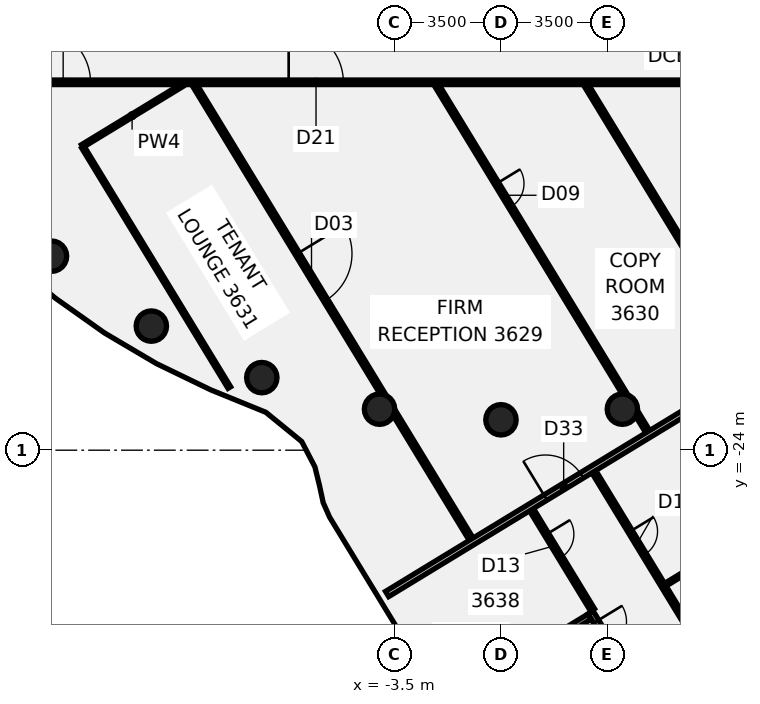
"""IFC4 building model, lengths in metres.
Left out: names, types, materials, properties, quantities, classifications, styles, units other than length and angle.
Written with IfcOpenShell. Run it as: python <this file> out.ifc"""

import sys

from ifc_helpers import new_model, si_unit, direction, frame, frame_2d, origin, origin_2d, place, context, subcontext, project, spatial, rectangle, circle, extrude, element, fill, save


model = new_model("IFC4")
c1 = context("Model", 3, precision=1e-05, world=origin(), true_north=direction((0.0, 1.0)))
c2 = subcontext(c1, "Body", "Model", "MODEL_VIEW")
j1 = project(units=[si_unit("LENGTHUNIT", "METRE"), si_unit("PLANEANGLEUNIT", "RADIAN")], contexts=[c1])
p1 = place(None, origin())
s1 = spatial("IfcSite", under=j1, at=p1, CompositionType="ELEMENT")
p2 = place(p1, origin())
s2 = spatial("IfcBuilding", under=s1, at=p2, CompositionType="ELEMENT")
p3 = place(p2, frame((0.0, 0.0, 148.0)))
s3 = spatial("IfcBuildingStorey", under=s2, at=p3, CompositionType="ELEMENT", Elevation=148.0)
for number, where, z_axis, x_axis in (
    (1, (-14.784, -17.619, -0.14), (0.0, 0.0, 1.0), (1.0, 0.0, 0.0)),
    (2, (-11.5, -19.919, -0.14), (0.0, 0.0, 1.0), (1.0, 0.0, 0.0)),
    (3, (-7.866, -21.613, -0.14), (0.0, 0.0, 1.0), (1.0, 0.0, 0.0)),
    (4, (-3.994, -22.651, -0.14), (0.0, 0.0, 1.0), (1.0, 0.0, 0.0)),
    (5, (0.0, -23.0, -0.14), (0.0, 0.0, 1.0), (1.0, 0.0, 0.0)),
    (6, (3.994, -22.651, -0.14), (0.0, 0.0, 1.0), (1.0, 0.0, 0.0)),
):
    element("IfcColumn", number, at=place(p3, frame(where, z_axis=z_axis, x_axis=x_axis)), inside=s3, PredefinedType="COLUMN", context=c2, shape_type="SweptSolid", body=[
        extrude(circle(Radius=0.5, at=origin_2d()), origin(), (0.0, 0.0, 1.0), 3.75),
    ])
p4 = place(p3, frame((-13.747, -14.039, 0.0), z_axis=(0.0, 0.0, 1.0), x_axis=(0.520158758084, -0.854069591069, 0.0)))
e7 = element("IfcWall", 7, at=p4, inside=s3, PredefinedType="PARTITIONING", context=c2, shape_type="SweptSolid", body=[
    extrude(rectangle(XDim=9.25, YDim=0.1, at=frame_2d((4.625, 0.0))), origin(), (0.0, 0.0, 1.0), 3.01),
])
p5 = place(p3, frame((-10.073, -11.998, 0.0), z_axis=(0.0, 0.0, 1.0), x_axis=(0.520207638853, -0.854039819024, 0.0)))
e8 = element("IfcWall", 8, at=p5, inside=s3, PredefinedType="PARTITIONING", context=c2, shape_type="SweptSolid", body=[
    extrude(rectangle(XDim=11.913, YDim=0.15, at=frame_2d((5.956, 0.0))), origin(), (0.0, 0.0, 1.0), 3.01),
])
p6 = place(p5, frame((6.485, 0.0, 0.0)))
e9 = element("IfcOpeningElement", 9, at=p6, cuts=e8, PredefinedType="OPENING", context=c2, shape_type="SweptSolid", body=[
    extrude(rectangle(XDim=1.8, YDim=2.1, at=frame_2d((0.9, 1.05))), frame((0.0, 0.085, 0.0), z_axis=(0.0, -1.0, 0.0), x_axis=(1.0, 0.0, 0.0)), (0.0, 0.0, 1.0), 0.17),
])
p7 = place(p3, frame((-3.515, -22.766, 0.0), z_axis=(0.0, 0.0, 1.0), x_axis=(0.520185263298, -0.854053447887, 0.0)))
e10 = element("IfcWall", 10, at=p7, inside=s3, PredefinedType="PARTITIONING", context=c2, shape_type="SweptSolid", body=[
    extrude(rectangle(XDim=4.875, YDim=0.15, at=frame_2d((2.437, 0.0))), origin(), (0.0, 0.0, 1.0), 3.01),
])
p8 = place(p3, frame((-2.111, -11.998, 0.0), z_axis=(0.0, 0.0, 1.0), x_axis=(0.520158414561, -0.854069800287, 0.0)))
e11 = element("IfcWall", 11, at=p8, inside=s3, PredefinedType="PARTITIONING", context=c2, shape_type="SweptSolid", body=[
    extrude(rectangle(XDim=11.902, YDim=0.15, at=frame_2d((5.951, 0.0))), origin(), (0.0, 0.0, 1.0), 3.01),
])
p9 = place(p8, frame((3.785, 0.0, 0.0)))
e12 = element("IfcOpeningElement", 12, at=p9, cuts=e11, PredefinedType="OPENING", context=c2, shape_type="SweptSolid", body=[
    extrude(rectangle(XDim=0.9, YDim=2.1, at=frame_2d((0.45, 1.05))), frame((0.0, 0.085, 0.0), z_axis=(0.0, -1.0, 0.0), x_axis=(1.0, 0.0, 0.0)), (0.0, 0.0, 1.0), 0.17),
])
p10 = place(p3, frame((4.465, -22.796, 0.0), z_axis=(0.0, 0.0, 1.0), x_axis=(0.519991350708, -0.854171525625, 0.0)))
e13 = element("IfcWall", 13, at=p10, inside=s3, PredefinedType="PARTITIONING", context=c2, shape_type="SweptSolid", body=[
    extrude(rectangle(XDim=0.698, YDim=0.15, at=frame_2d((0.349, 0.0))), origin(), (0.0, 0.0, 1.0), 3.01),
])
p11 = place(p3, frame((1.004, -25.955, 0.0), z_axis=(0.0, 0.0, 1.0), x_axis=(0.520149611464, -0.854075161619, 0.0)))
e14 = element("IfcWall", 14, at=p11, inside=s3, PredefinedType="PARTITIONING", context=c2, shape_type="SweptSolid", body=[
    extrude(rectangle(XDim=3.86, YDim=0.15, at=frame_2d((1.93, 0.0))), origin(), (0.0, 0.0, 1.0), 3.01),
])
p12 = place(p11, frame((0.95, 0.0, 0.0)))
e15 = element("IfcOpeningElement", 15, at=p12, cuts=e14, PredefinedType="OPENING", context=c2, shape_type="SweptSolid", body=[
    extrude(rectangle(XDim=0.9, YDim=2.1, at=frame_2d((0.45, 1.05))), frame((0.0, 0.085, 0.0), z_axis=(0.0, -1.0, 0.0), x_axis=(1.0, 0.0, 0.0)), (0.0, 0.0, 1.0), 0.17),
])
p13 = place(p3, frame((2.807, -11.998, 0.0), z_axis=(0.0, 0.0, 1.0), x_axis=(0.520227143578, -0.854027938117, 0.0)))
e16 = element("IfcWall", 16, at=p13, inside=s3, PredefinedType="PARTITIONING", context=c2, shape_type="SweptSolid", body=[
    extrude(rectangle(XDim=13.129, YDim=0.15, at=frame_2d((6.564, 0.0))), origin(), (0.0, 0.0, 1.0), 3.01),
])
p14 = place(p3, frame((3.054, -24.706, 0.0), z_axis=(0.0, 0.0, 1.0), x_axis=(0.520172066884, -0.854061485394, 0.0)))
e17 = element("IfcWall", 17, at=p14, inside=s3, PredefinedType="PARTITIONING", context=c2, shape_type="SweptSolid", body=[
    extrude(rectangle(XDim=17.82, YDim=0.15, at=frame_2d((8.91, 0.0))), origin(), (0.0, 0.0, 1.0), 3.01),
])
p15 = place(p14, frame((2.3, 0.0, 0.0)))
e18 = element("IfcOpeningElement", 18, at=p15, cuts=e17, PredefinedType="OPENING", context=c2, shape_type="SweptSolid", body=[
    extrude(rectangle(XDim=0.9, YDim=2.1, at=frame_2d((0.45, 1.05))), frame((0.0, 0.085, 0.0), z_axis=(0.0, -1.0, 0.0), x_axis=(1.0, 0.0, 0.0)), (0.0, 0.0, 1.0), 0.17),
])
p16 = place(p14, frame((5.599, 0.0, 0.0)))
e19 = element("IfcOpeningElement", 19, at=p16, cuts=e17, PredefinedType="OPENING", context=c2, shape_type="SweptSolid", body=[
    extrude(rectangle(XDim=0.9, YDim=2.1, at=frame_2d((0.45, 1.05))), frame((0.0, 0.085, 0.0), z_axis=(0.0, -1.0, 0.0), x_axis=(1.0, 0.0, 0.0)), (0.0, 0.0, 1.0), 0.17),
])
p17 = place(p14, frame((11.3, 0.0, 0.0)))
e20 = element("IfcOpeningElement", 20, at=p17, cuts=e17, PredefinedType="OPENING", context=c2, shape_type="SweptSolid", body=[
    extrude(rectangle(XDim=0.9, YDim=2.1, at=frame_2d((0.45, 1.05))), frame((0.0, 0.085, 0.0), z_axis=(0.0, -1.0, 0.0), x_axis=(1.0, 0.0, 0.0)), (0.0, 0.0, 1.0), 0.17),
])
p18 = place(p14, frame((14.6, 0.0, 0.0)))
e21 = element("IfcOpeningElement", 21, at=p18, cuts=e17, PredefinedType="OPENING", context=c2, shape_type="SweptSolid", body=[
    extrude(rectangle(XDim=0.9, YDim=2.1, at=frame_2d((0.45, 1.05))), frame((0.0, 0.085, 0.0), z_axis=(0.0, -1.0, 0.0), x_axis=(1.0, 0.0, 0.0)), (0.0, 0.0, 1.0), 0.17),
])
p19 = place(p3, frame((-17.1, -11.9, 0.0), z_axis=(0.0, 0.0, 1.0), x_axis=(1.0, 0.0, 0.0)))
e22 = element("IfcWall", 22, at=p19, inside=s3, PredefinedType="PARTITIONING", context=c2, shape_type="SweptSolid", body=[
    extrude(rectangle(XDim=34.165, YDim=0.15, at=frame_2d((17.083, 0.0))), origin(), (0.0, 0.0, 1.0), 3.01),
])
p20 = place(p19, frame((10.117, 0.0, 0.0)))
e23 = element("IfcOpeningElement", 23, at=p20, cuts=e22, PredefinedType="OPENING", context=c2, shape_type="SweptSolid", body=[
    extrude(rectangle(XDim=1.8, YDim=2.1, at=frame_2d((0.9, 1.05))), frame((0.0, 0.085, 0.0), z_axis=(0.0, -1.0, 0.0), x_axis=(1.0, 0.0, 0.0)), (0.0, 0.0, 1.0), 0.17),
])
p21 = place(p19, frame((1.8, 0.0, 0.0)))
e24 = element("IfcOpeningElement", 24, at=p21, cuts=e22, PredefinedType="OPENING", context=c2, shape_type="SweptSolid", body=[
    extrude(rectangle(XDim=1.8, YDim=2.1, at=frame_2d((0.9, 1.05))), frame((0.0, 0.085, 0.0), z_axis=(0.0, -1.0, 0.0), x_axis=(1.0, 0.0, 0.0)), (0.0, 0.0, 1.0), 0.17),
])
p22 = place(p19, frame((25.997, 0.0, 0.0)))
e25 = element("IfcOpeningElement", 25, at=p22, cuts=e22, PredefinedType="OPENING", context=c2, shape_type="SweptSolid", body=[
    extrude(rectangle(XDim=1.8, YDim=2.1, at=frame_2d((0.9, 1.05))), frame((0.0, 0.085, 0.0), z_axis=(0.0, -1.0, 0.0), x_axis=(1.0, 0.0, 0.0)), (0.0, 0.0, 1.0), 0.17),
])
p23 = place(p3, frame((-13.773, -13.996, 0.0), z_axis=(0.0, 0.0, 1.0), x_axis=(0.85407452776, 0.520150652245, 0.0)))
e26 = element("IfcWall", 26, at=p23, inside=s3, PredefinedType="PARTITIONING", context=c2, shape_type="SweptSolid", body=[
    extrude(rectangle(XDim=3.84, YDim=0.1, at=frame_2d((1.92, 0.0))), origin(), (0.0, 0.0, 1.0), 3.01),
])
p24 = place(p3, frame((-3.745, -28.73, 0.0), z_axis=(0.0, 0.0, 1.0), x_axis=(0.854090748312, 0.520124017565, 0.0)))
e27 = element("IfcWall", 27, at=p24, inside=s3, PredefinedType="PARTITIONING", context=c2, shape_type="SweptSolid", body=[
    extrude(rectangle(XDim=13.121, YDim=0.2, at=frame_2d((6.561, 0.0))), origin(), (0.0, 0.0, 1.0), 3.01),
])
p25 = place(p24, frame((6.099, 0.0, 0.0)))
e28 = element("IfcOpeningElement", 28, at=p25, cuts=e27, PredefinedType="OPENING", context=c2, shape_type="SweptSolid", body=[
    extrude(rectangle(XDim=1.4, YDim=2.1, at=frame_2d((0.7, 1.05))), frame((0.0, 0.11, 0.0), z_axis=(0.0, -1.0, 0.0), x_axis=(1.0, 0.0, 0.0)), (0.0, 0.0, 1.0), 0.22),
])
p26 = place(p3, frame((5.41, -28.422, 0.0), z_axis=(0.0, 0.0, 1.0), x_axis=(0.854092814708, 0.520120624341, 0.0)))
e29 = element("IfcWall", 29, at=p26, inside=s3, PredefinedType="PARTITIONING", context=c2, shape_type="SweptSolid", body=[
    extrude(rectangle(XDim=3.701, YDim=0.1, at=frame_2d((1.851, 0.0))), origin(), (0.0, 0.0, 1.0), 3.01),
])
p27 = place(p3, frame((2.947, -29.338, -0.14), z_axis=(0.0, 0.0, 1.0), x_axis=(0.520196616646, -0.854046532708, 0.0)))
e30 = element("IfcWall", 30, at=p27, inside=s3, PredefinedType="SHEAR", context=c2, shape_type="SweptSolid", body=[
    extrude(rectangle(XDim=6.7, YDim=0.2, at=frame_2d((3.35, 0.0))), origin(), (0.0, 0.0, 1.0), 3.15),
])
p28 = place(p27, frame((0.35, 0.0, 0.0)))
e31 = element("IfcOpeningElement", 31, at=p28, cuts=e30, PredefinedType="OPENING", context=c2, shape_type="SweptSolid", body=[
    extrude(rectangle(XDim=1.0, YDim=2.1, at=frame_2d((0.5, 1.05))), frame((0.0, 0.11, 0.0), z_axis=(0.0, -1.0, 0.0), x_axis=(1.0, 0.0, 0.0)), (0.0, 0.0, 1.0), 0.22),
])
p29 = place(p3, frame((0.181, -31.14, -0.14), z_axis=(0.0, 0.0, 1.0), x_axis=(0.854074782587, 0.520150233826, 0.0)))
e32 = element("IfcWall", 32, at=p29, inside=s3, PredefinedType="SHEAR", context=c2, shape_type="SweptSolid", body=[
    extrude(rectangle(XDim=3.2, YDim=0.2, at=frame_2d((1.6, 0.0))), origin(), (0.0, 0.0, 1.0), 3.15),
])
p30 = place(p6, frame((1.8, 0.0, 0.0), z_axis=(0.0, 0.0, 1.0), x_axis=(-1.0, 0.0, 0.0)))
e33 = element("IfcDoor", 33, at=p30, inside=s3, OperationType="DOUBLE_DOOR_SINGLE_SWING", PredefinedType="DOOR", context=c2, shape_type="SweptSolid", body=[
    extrude(rectangle(XDim=1.8, YDim=2.1, at=frame_2d((0.9, 1.05))), frame((0.0, 0.025, 0.0), z_axis=(0.0, -1.0, 0.0), x_axis=(1.0, 0.0, 0.0)), (0.0, 0.0, 1.0), 0.05),
])
fill(e9, e33)
p31 = place(p9, origin())
e34 = element("IfcDoor", 34, at=p31, inside=s3, OperationType="SINGLE_SWING_RIGHT", PredefinedType="DOOR", context=c2, shape_type="SweptSolid", body=[
    extrude(rectangle(XDim=0.9, YDim=2.1, at=frame_2d((0.45, 1.05))), frame((0.0, 0.025, 0.0), z_axis=(0.0, -1.0, 0.0), x_axis=(1.0, 0.0, 0.0)), (0.0, 0.0, 1.0), 0.05),
])
fill(e12, e34)
p32 = place(p12, frame((0.9, 0.0, 0.0), z_axis=(0.0, 0.0, 1.0), x_axis=(-1.0, 0.0, 0.0)))
e35 = element("IfcDoor", 35, at=p32, inside=s3, OperationType="SINGLE_SWING_LEFT", PredefinedType="DOOR", context=c2, shape_type="SweptSolid", body=[
    extrude(rectangle(XDim=0.9, YDim=2.1, at=frame_2d((0.45, 1.05))), frame((0.0, 0.025, 0.0), z_axis=(0.0, -1.0, 0.0), x_axis=(1.0, 0.0, 0.0)), (0.0, 0.0, 1.0), 0.05),
])
fill(e15, e35)
p33 = place(p15, origin())
e36 = element("IfcDoor", 36, at=p33, inside=s3, OperationType="SINGLE_SWING_RIGHT", PredefinedType="DOOR", context=c2, shape_type="SweptSolid", body=[
    extrude(rectangle(XDim=0.9, YDim=2.1, at=frame_2d((0.45, 1.05))), frame((0.0, 0.025, 0.0), z_axis=(0.0, -1.0, 0.0), x_axis=(1.0, 0.0, 0.0)), (0.0, 0.0, 1.0), 0.05),
])
fill(e18, e36)
p34 = place(p20, origin())
e37 = element("IfcDoor", 37, at=p34, inside=s3, OperationType="DOUBLE_DOOR_SINGLE_SWING", PredefinedType="DOOR", context=c2, shape_type="SweptSolid", body=[
    extrude(rectangle(XDim=1.8, YDim=2.1, at=frame_2d((0.9, 1.05))), frame((0.0, 0.025, 0.0), z_axis=(0.0, -1.0, 0.0), x_axis=(1.0, 0.0, 0.0)), (0.0, 0.0, 1.0), 0.05),
])
fill(e23, e37)
p35 = place(p21, frame((1.8, 0.0, 0.0), z_axis=(0.0, 0.0, 1.0), x_axis=(-1.0, 0.0, 0.0)))
e38 = element("IfcDoor", 38, at=p35, inside=s3, OperationType="DOUBLE_DOOR_SINGLE_SWING", PredefinedType="DOOR", context=c2, shape_type="SweptSolid", body=[
    extrude(rectangle(XDim=1.8, YDim=2.1, at=frame_2d((0.9, 1.05))), frame((0.0, 0.025, 0.0), z_axis=(0.0, -1.0, 0.0), x_axis=(1.0, 0.0, 0.0)), (0.0, 0.0, 1.0), 0.05),
])
fill(e24, e38)
p36 = place(p25, origin())
e39 = element("IfcDoor", 39, at=p36, inside=s3, OperationType="DOUBLE_DOOR_SINGLE_SWING", PredefinedType="DOOR", context=c2, shape_type="SweptSolid", body=[
    extrude(rectangle(XDim=1.4, YDim=2.1, at=frame_2d((0.7, 1.05))), frame((0.0, 0.025, 0.0), z_axis=(0.0, -1.0, 0.0), x_axis=(1.0, 0.0, 0.0)), (0.0, 0.0, 1.0), 0.05),
])
fill(e28, e39)
p37 = place(p28, origin())
e40 = element("IfcDoor", 40, at=p37, inside=s3, OperationType="SINGLE_SWING_LEFT", PredefinedType="DOOR", context=c2, shape_type="SweptSolid", body=[
    extrude(rectangle(XDim=1.0, YDim=2.1, at=frame_2d((0.5, 1.05))), frame((0.0, 0.025, 0.0), z_axis=(0.0, -1.0, 0.0), x_axis=(1.0, 0.0, 0.0)), (0.0, 0.0, 1.0), 0.05),
])
fill(e31, e40)
save(model, sys.argv[1])
